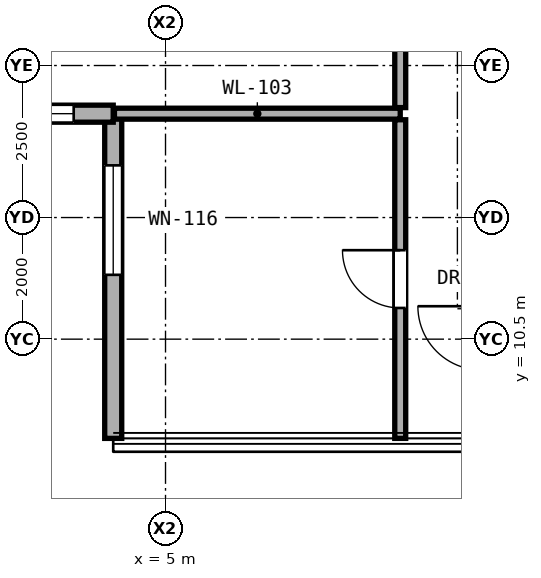
"""IFC4 building model, lengths in metres.
Left out: names, types, materials, properties, quantities, classifications, styles, units other than length and angle.
Written with IfcOpenShell. Run it as: python <this file> out.ifc"""

import sys

from ifc_helpers import new_model, si_unit, direction, frame, frame_2d, origin, place, context, subcontext, project, spatial, rectangle, extrude, element, fill, save


model = new_model("IFC4")
c1 = context("Model", 3, precision=1e-05, world=origin(), true_north=direction((0.0, 1.0)))
c2 = subcontext(c1, "Body", "Model", "MODEL_VIEW")
j1 = project(units=[si_unit("LENGTHUNIT", "METRE"), si_unit("PLANEANGLEUNIT", "RADIAN")], contexts=[c1])
p1 = place(None, origin())
s1 = spatial("IfcSite", under=j1, at=p1, CompositionType="ELEMENT")
p2 = place(p1, origin())
s2 = spatial("IfcBuilding", under=s1, at=p2, CompositionType="ELEMENT")
p3 = place(p2, frame((0.0, 0.0, 65.3)))
s3 = spatial("IfcBuildingStorey", under=s2, at=p3, CompositionType="ELEMENT", Elevation=65.3)
p4 = place(p3, frame((4.14, 14.208, 0.0), z_axis=(0.0, 0.0, 1.0), x_axis=(0.0, -1.0, 0.0)))
e1 = element("IfcWall", 1, at=p4, inside=s3, PredefinedType="SOLIDWALL", context=c2, shape_type="SweptSolid", body=[
    extrude(rectangle(XDim=5.34, YDim=0.28, at=frame_2d((2.67, 0.0))), origin(), (0.0, 0.0, 1.0), 3.04),
])
p5 = place(p4, frame((0.85, 0.0, 0.79)))
e2 = element("IfcOpeningElement", 2, at=p5, cuts=e1, PredefinedType="OPENING", context=c2, shape_type="SweptSolid", body=[
    extrude(rectangle(XDim=1.8, YDim=2.1, at=frame_2d((0.9, 1.05))), frame((0.0, 0.15, 0.0), z_axis=(0.0, -1.0, 0.0), x_axis=(1.0, 0.0, 0.0)), (0.0, 0.0, 1.0), 0.3),
])
p6 = place(p3, frame((-1.2, 14.208, 0.0), z_axis=(0.0, 0.0, 1.0), x_axis=(1.0, 0.0, 0.0)))
e3 = element("IfcWall", 3, at=p6, inside=s3, PredefinedType="SOLIDWALL", context=c2, shape_type="SweptSolid", body=[
    extrude(rectangle(XDim=5.34, YDim=0.28, at=frame_2d((2.67, 0.0))), origin(), (0.0, 0.0, 1.0), 3.04),
])
p7 = place(p6, frame((3.59, 0.0, 0.85)))
e4 = element("IfcOpeningElement", 4, at=p7, cuts=e3, PredefinedType="OPENING", context=c2, shape_type="SweptSolid", body=[
    extrude(rectangle(XDim=1.1, YDim=2.0, at=frame_2d((0.55, 1.0))), frame((0.0, 0.15, 0.0), z_axis=(0.0, -1.0, 0.0), x_axis=(1.0, 0.0, 0.0)), (0.0, 0.0, 1.0), 0.3),
])
p8 = place(p3, frame((4.16, 14.208, 0.0), z_axis=(0.0, 0.0, 1.0), x_axis=(1.0, 0.0, 0.0)))
e5 = element("IfcWall", 5, at=p8, inside=s3, PredefinedType="PARTITIONING", context=c2, shape_type="SweptSolid", body=[
    extrude(rectangle(XDim=4.7, YDim=0.18, at=frame_2d((2.35, 0.0))), origin(), (0.0, 0.0, 1.0), 3.06),
])
p9 = place(p3, frame((8.86, 8.868, 0.0), z_axis=(0.0, 0.0, 1.0), x_axis=(0.0, 1.0, 0.0)))
e6 = element("IfcWall", 6, at=p9, inside=s3, PredefinedType="PARTITIONING", context=c2, shape_type="SweptSolid", body=[
    extrude(rectangle(XDim=5.24, YDim=0.18, at=frame_2d((2.62, 0.0))), origin(), (0.0, 0.0, 1.0), 3.06),
])
p10 = place(p9, frame((2.145, 0.0, 0.0)))
e7 = element("IfcOpeningElement", 7, at=p10, cuts=e6, PredefinedType="OPENING", context=c2, shape_type="SweptSolid", body=[
    extrude(rectangle(XDim=0.95, YDim=2.15, at=frame_2d((0.475, 1.075))), frame((0.0, 0.1, 0.0), z_axis=(0.0, -1.0, 0.0), x_axis=(1.0, 0.0, 0.0)), (0.0, 0.0, 1.0), 0.2),
])
p11 = place(p3, frame((8.86, 14.308, 0.0), z_axis=(0.0, 0.0, 1.0), x_axis=(0.0, 1.0, 0.0)))
e8 = element("IfcWall", 8, at=p11, inside=s3, PredefinedType="PARTITIONING", context=c2, shape_type="SweptSolid", body=[
    extrude(rectangle(XDim=8.092, YDim=0.18, at=frame_2d((4.046, 0.0))), origin(), (0.0, 0.0, 1.0), 2.436),
])
p12 = place(p11, frame((3.521, 0.0, 0.0)))
e9 = element("IfcOpeningElement", 9, at=p12, cuts=e8, PredefinedType="OPENING", context=c2, shape_type="SweptSolid", body=[
    extrude(rectangle(XDim=1.05, YDim=2.2, at=frame_2d((0.525, 1.1))), frame((0.0, 0.1, 0.0), z_axis=(0.0, -1.0, 0.0), x_axis=(1.0, 0.0, 0.0)), (0.0, 0.0, 1.0), 0.2),
])
p13 = place(p5, origin())
e10 = element("IfcWindow", 10, at=p13, inside=s3, PartitioningType="SINGLE_PANEL", PredefinedType="WINDOW", context=c2, shape_type="SweptSolid", body=[
    extrude(rectangle(XDim=1.8, YDim=2.1, at=frame_2d((0.9, 1.05))), frame((0.0, 0.03, 0.0), z_axis=(0.0, -1.0, 0.0), x_axis=(1.0, 0.0, 0.0)), (0.0, 0.0, 1.0), 0.06),
])
fill(e2, e10)
p14 = place(p7, origin())
e11 = element("IfcWindow", 11, at=p14, inside=s3, PartitioningType="SINGLE_PANEL", PredefinedType="WINDOW", context=c2, shape_type="SweptSolid", body=[
    extrude(rectangle(XDim=1.1, YDim=2.0, at=frame_2d((0.55, 1.0))), frame((0.0, 0.03, 0.0), z_axis=(0.0, -1.0, 0.0), x_axis=(1.0, 0.0, 0.0)), (0.0, 0.0, 1.0), 0.06),
])
fill(e4, e11)
p15 = place(p10, origin())
e12 = element("IfcDoor", 12, at=p15, inside=s3, OperationType="SINGLE_SWING_RIGHT", PredefinedType="DOOR", context=c2, shape_type="SweptSolid", body=[
    extrude(rectangle(XDim=0.95, YDim=2.15, at=frame_2d((0.475, 1.075))), frame((0.0, 0.025, 0.0), z_axis=(0.0, -1.0, 0.0), x_axis=(1.0, 0.0, 0.0)), (0.0, 0.0, 1.0), 0.05),
])
fill(e7, e12)
save(model, sys.argv[1])
